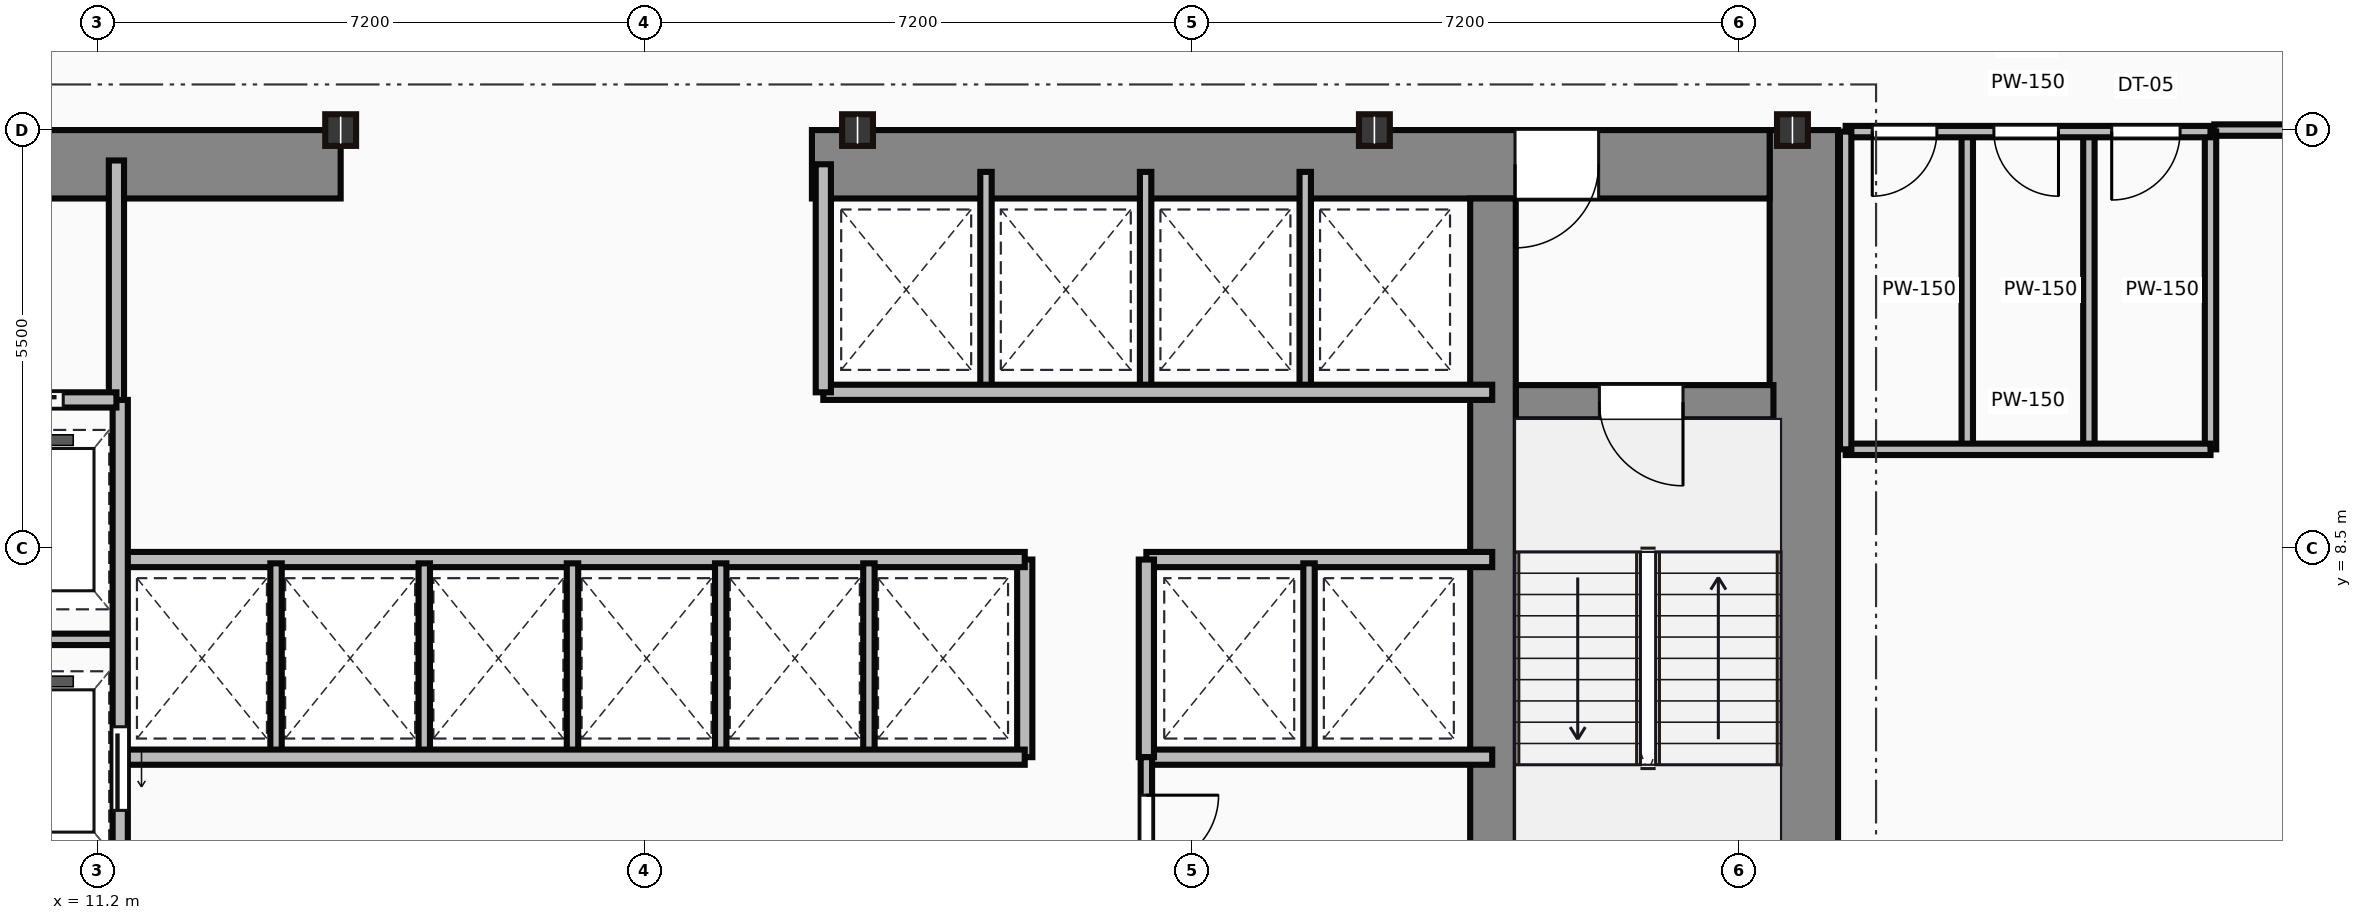
"""IFC4 building model, lengths in metres.
Left out: names, types, materials, properties, quantities, classifications, styles, units other than length and angle.
Written with IfcOpenShell. Run it as: python <this file> out.ifc"""

import sys

from ifc_helpers import new_model, si_unit, direction, frame, frame_2d, origin, origin_2d, place, context, subcontext, project, spatial, rectangle, i_section, extrude, source, transform, mapped, element, fill, save


model = new_model("IFC4")
c1 = context("Model", 3, precision=1e-05, world=origin(), true_north=direction((0.0, 1.0)))
c2 = subcontext(c1, "Body", "Model", "MODEL_VIEW")
j1 = project(units=[si_unit("LENGTHUNIT", "METRE"), si_unit("PLANEANGLEUNIT", "RADIAN")], contexts=[c1])
p1 = place(None, origin())
s1 = spatial("IfcSite", under=j1, at=p1, CompositionType="ELEMENT")
p2 = place(p1, origin())
s2 = spatial("IfcBuilding", under=s1, at=p2, CompositionType="ELEMENT")
p3 = place(p2, frame((0.0, 0.0, 61.7)))
s3 = spatial("IfcBuildingStorey", under=s2, at=p3, CompositionType="ELEMENT", Elevation=61.7)
m1 = source(origin(), c2, "Body", "SweptSolid", [
    extrude(rectangle(XDim=13.1, YDim=0.9, at=frame_2d((6.55, 0.0))), origin(), (0.0, 0.0, 1.0), 3.65),
])
p4 = place(p3, frame((33.65, 0.9, 0.0), z_axis=(0.0, 0.0, 1.0), x_axis=(0.0, 1.0, 0.0)))
e1 = element("IfcWall", 1, at=p4, inside=s3, PredefinedType="SHEAR", context=c2, shape_type="MappedRepresentation", body=[
    mapped(m1, transform((0.0, 0.0, 0.0))),
])
m2 = source(origin(), c2, "Body", "SweptSolid", [
    extrude(rectangle(XDim=9.1, YDim=0.9, at=frame_2d((4.55, 0.0))), origin(), (0.0, 0.0, 1.0), 3.65),
])
p5 = place(p3, frame((5.3, 13.55, 0.0), z_axis=(0.0, 0.0, 1.0), x_axis=(1.0, 0.0, 0.0)))
e2 = element("IfcWall", 2, at=p5, inside=s3, PredefinedType="SHEAR", context=c2, shape_type="MappedRepresentation", body=[
    mapped(m2, transform((0.0, 0.0, 0.0))),
])
p6 = place(p5, frame((4.1, 0.0, 0.0)))
e3 = element("IfcOpeningElement", 3, at=p6, cuts=e2, PredefinedType="OPENING", context=c2, shape_type="SweptSolid", body=[
    extrude(rectangle(XDim=1.1, YDim=2.15, at=frame_2d((0.55, 1.075))), frame((0.0, 0.46, 0.0), z_axis=(0.0, -1.0, 0.0), x_axis=(1.0, 0.0, 0.0)), (0.0, 0.0, 1.0), 0.92),
])
m3 = source(origin(), c2, "Body", "SweptSolid", [
    extrude(rectangle(XDim=12.6, YDim=0.9, at=frame_2d((6.3, 0.0))), origin(), (0.0, 0.0, 1.0), 3.65),
])
p7 = place(p3, frame((20.6, 13.55, 0.0), z_axis=(0.0, 0.0, 1.0), x_axis=(1.0, 0.0, 0.0)))
e4 = element("IfcWall", 4, at=p7, inside=s3, PredefinedType="SHEAR", context=c2, shape_type="MappedRepresentation", body=[
    mapped(m3, transform((0.0, 0.0, 0.0))),
])
p8 = place(p7, frame((9.25, 0.0, 0.0)))
e5 = element("IfcOpeningElement", 5, at=p8, cuts=e4, PredefinedType="OPENING", context=c2, shape_type="SweptSolid", body=[
    extrude(rectangle(XDim=1.1, YDim=2.15, at=frame_2d((0.55, 1.075))), frame((0.0, 0.46, 0.0), z_axis=(0.0, -1.0, 0.0), x_axis=(1.0, 0.0, 0.0)), (0.0, 0.0, 1.0), 0.92),
])
m4 = source(origin(), c2, "Body", "SweptSolid", [
    extrude(rectangle(XDim=12.2, YDim=0.6, at=frame_2d((6.1, 0.0))), origin(), (0.0, 0.0, 1.0), 3.65),
])
p9 = place(p3, frame((29.56, 0.9, 0.0), z_axis=(0.0, 0.0, 1.0), x_axis=(0.0, 1.0, 0.0)))
e6 = element("IfcWall", 6, at=p9, inside=s3, PredefinedType="SHEAR", context=c2, shape_type="MappedRepresentation", body=[
    mapped(m4, transform((0.0, 0.0, 0.0))),
])
m5 = source(origin(), c2, "Body", "SweptSolid", [
    extrude(rectangle(XDim=3.39, YDim=0.45, at=frame_2d((1.695, 0.0))), origin(), (0.0, 0.0, 1.0), 3.65),
])
p10 = place(p3, frame((29.86, 10.42, 0.0), z_axis=(0.0, 0.0, 1.0), x_axis=(1.0, 0.0, 0.0)))
e7 = element("IfcWall", 7, at=p10, inside=s3, PredefinedType="SHEAR", context=c2, shape_type="MappedRepresentation", body=[
    mapped(m5, transform((0.0, 0.0, 0.0))),
])
p11 = place(p10, frame((1.1, 0.0, 0.0)))
e8 = element("IfcOpeningElement", 8, at=p11, cuts=e7, PredefinedType="OPENING", context=c2, shape_type="SweptSolid", body=[
    extrude(rectangle(XDim=1.1, YDim=2.15, at=frame_2d((0.55, 1.075))), frame((0.0, 0.235, 0.0), z_axis=(0.0, -1.0, 0.0), x_axis=(1.0, 0.0, 0.0)), (0.0, 0.0, 1.0), 0.47),
])
m6 = source(origin(), c2, "Body", "SweptSolid", [
    extrude(i_section(OverallWidth=0.406, OverallDepth=0.416, WebThickness=0.03, FlangeThickness=0.048, at=origin_2d()), origin(), (0.0, 0.0, 1.0), 3.65),
])
for number, where, z_axis, x_axis in (
    (9, (14.4, 14.0, 0.0), (0.0, 0.0, 1.0), (1.0, 0.0, 0.0)),
    (10, (21.2, 14.0, 0.0), (0.0, 0.0, 1.0), (1.0, 0.0, 0.0)),
    (11, (28.0, 14.0, 0.0), (0.0, 0.0, 1.0), (1.0, 0.0, 0.0)),
    (12, (33.5, 14.0, 0.0), (0.0, 0.0, 1.0), (1.0, 0.0, 0.0)),
):
    element("IfcColumn", number, at=place(p3, frame(where, z_axis=z_axis, x_axis=x_axis)), inside=s3, PredefinedType="COLUMN", context=c2, shape_type="MappedRepresentation", body=[
        mapped(m6, transform((0.0, 0.0, 0.0))),
    ])
m7 = source(origin(), c2, "Body", "SweptSolid", [
    extrude(rectangle(XDim=3.18, YDim=0.2, at=frame_2d((1.59, 0.0))), origin(), (0.0, 0.0, 1.0), 3.4),
])
p12 = place(p3, frame((11.45, 10.42, 0.0), z_axis=(0.0, 0.0, 1.0), x_axis=(0.0, 1.0, 0.0)))
e13 = element("IfcWall", 13, at=p12, inside=s3, PredefinedType="PARTITIONING", context=c2, shape_type="MappedRepresentation", body=[
    mapped(m7, transform((0.0, 0.0, 0.0))),
])
m8 = source(origin(), c2, "Body", "SweptSolid", [
    extrude(rectangle(XDim=2.35, YDim=0.2, at=frame_2d((1.175, 0.0))), origin(), (0.0, 0.0, 1.0), 3.4),
])
p13 = place(p3, frame((9.1, 10.45, 0.0), z_axis=(0.0, 0.0, 1.0), x_axis=(1.0, 0.0, 0.0)))
e14 = element("IfcWall", 14, at=p13, inside=s3, PredefinedType="PARTITIONING", context=c2, shape_type="MappedRepresentation", body=[
    mapped(m8, transform((0.0, 0.0, 0.0))),
])
p14 = place(p13, frame((0.55, 0.0, 0.0)))
e15 = element("IfcOpeningElement", 15, at=p14, cuts=e14, PredefinedType="OPENING", context=c2, shape_type="SweptSolid", body=[
    extrude(rectangle(XDim=1.1, YDim=2.15, at=frame_2d((0.55, 1.075))), frame((0.0, 0.11, 0.0), z_axis=(0.0, -1.0, 0.0), x_axis=(1.0, 0.0, 0.0)), (0.0, 0.0, 1.0), 0.22),
])
m9 = source(origin(), c2, "Body", "SweptSolid", [
    extrude(rectangle(XDim=9.6, YDim=0.2, at=frame_2d((4.8, 0.0))), origin(), (0.0, 0.0, 1.0), 3.4),
])
p15 = place(p3, frame((11.5, 0.85, 0.0), z_axis=(0.0, 0.0, 1.0), x_axis=(0.0, 1.0, 0.0)))
e16 = element("IfcWall", 16, at=p15, inside=s3, PredefinedType="PARTITIONING", context=c2, shape_type="MappedRepresentation", body=[
    mapped(m9, transform((0.0, 0.0, 0.0))),
])
p16 = place(p15, frame((4.2, 0.0, 0.0)))
e17 = element("IfcOpeningElement", 17, at=p16, cuts=e16, PredefinedType="OPENING", context=c2, shape_type="SweptSolid", body=[
    extrude(rectangle(XDim=1.1, YDim=2.15, at=frame_2d((0.55, 1.075))), frame((0.0, 0.11, 0.0), z_axis=(0.0, -1.0, 0.0), x_axis=(1.0, 0.0, 0.0)), (0.0, 0.0, 1.0), 0.22),
])
p17 = place(p15, frame((0.9, 0.0, 0.0)))
e18 = element("IfcOpeningElement", 18, at=p17, cuts=e16, PredefinedType="OPENING", context=c2, shape_type="SweptSolid", body=[
    extrude(rectangle(XDim=1.2, YDim=2.15, at=frame_2d((0.6, 1.075))), frame((0.0, 0.11, 0.0), z_axis=(0.0, -1.0, 0.0), x_axis=(1.0, 0.0, 0.0)), (0.0, 0.0, 1.0), 0.22),
])
m10 = source(origin(), c2, "Body", "SweptSolid", [
    extrude(rectangle(XDim=2.4, YDim=0.15, at=frame_2d((1.2, 0.0))), origin(), (0.0, 0.0, 1.0), 3.4),
])
p18 = place(p3, frame((9.1, 7.3, 0.0), z_axis=(0.0, 0.0, 1.0), x_axis=(1.0, 0.0, 0.0)))
e19 = element("IfcWall", 19, at=p18, inside=s3, PredefinedType="PARTITIONING", context=c2, shape_type="MappedRepresentation", body=[
    mapped(m10, transform((0.0, 0.0, 0.0))),
])
m11 = source(origin(), c2, "Body", "SweptSolid", [
    extrude(rectangle(XDim=11.85, YDim=0.2, at=frame_2d((5.925, 0.0))), origin(), (0.0, 0.0, 1.0), 3.4),
])
for number, where, z_axis, x_axis in (
    (20, (11.55, 5.75, 0.0), (0.0, 0.0, 1.0), (1.0, 0.0, 0.0)),
    (21, (11.55, 8.35, 0.0), (0.0, 0.0, 1.0), (1.0, 0.0, 0.0)),
):
    element("IfcWall", number, at=place(p3, frame(where, z_axis=z_axis, x_axis=x_axis)), inside=s3, PredefinedType="PARTITIONING", context=c2, shape_type="MappedRepresentation", body=[
        mapped(m11, transform((0.0, 0.0, 0.0))),
    ])
m12 = source(origin(), c2, "Body", "SweptSolid", [
    extrude(rectangle(XDim=2.6, YDim=0.2, at=frame_2d((1.3, 0.0))), origin(), (0.0, 0.0, 1.0), 3.4),
])
p19 = place(p3, frame((23.4, 5.75, 0.0), z_axis=(0.0, 0.0, 1.0), x_axis=(0.0, 1.0, 0.0)))
e22 = element("IfcWall", 22, at=p19, inside=s3, PredefinedType="PARTITIONING", context=c2, shape_type="MappedRepresentation", body=[
    mapped(m12, transform((0.0, 0.0, 0.0))),
])
m13 = source(origin(), c2, "Body", "SweptSolid", [
    extrude(rectangle(XDim=2.5, YDim=0.15, at=frame_2d((1.25, 0.0))), origin(), (0.0, 0.0, 1.0), 3.4),
])
for number, where, z_axis, x_axis in (
    (23, (13.55, 5.8, 0.0), (0.0, 0.0, 1.0), (0.0, 1.0, 0.0)),
    (24, (15.5, 5.8, 0.0), (0.0, 0.0, 1.0), (0.0, 1.0, 0.0)),
    (25, (17.45, 5.8, 0.0), (0.0, 0.0, 1.0), (0.0, 1.0, 0.0)),
    (26, (19.4, 5.8, 0.0), (0.0, 0.0, 1.0), (0.0, 1.0, 0.0)),
    (27, (21.35, 5.8, 0.0), (0.0, 0.0, 1.0), (0.0, 1.0, 0.0)),
):
    element("IfcWall", number, at=place(p3, frame(where, z_axis=z_axis, x_axis=x_axis)), inside=s3, PredefinedType="PARTITIONING", context=c2, shape_type="MappedRepresentation", body=[
        mapped(m13, transform((0.0, 0.0, 0.0))),
    ])
m14 = source(origin(), c2, "Body", "SweptSolid", [
    extrude(rectangle(XDim=8.8, YDim=0.2, at=frame_2d((4.4, 0.0))), origin(), (0.0, 0.0, 1.0), 3.4),
])
p20 = place(p3, frame((20.75, 10.55, 0.0), z_axis=(0.0, 0.0, 1.0), x_axis=(1.0, 0.0, 0.0)))
e28 = element("IfcWall", 28, at=p20, inside=s3, PredefinedType="PARTITIONING", context=c2, shape_type="MappedRepresentation", body=[
    mapped(m14, transform((0.0, 0.0, 0.0))),
])
m15 = source(origin(), c2, "Body", "SweptSolid", [
    extrude(rectangle(XDim=3.0, YDim=0.2, at=frame_2d((1.5, 0.0))), origin(), (0.0, 0.0, 1.0), 3.4),
])
p21 = place(p3, frame((20.75, 10.55, 0.0), z_axis=(0.0, 0.0, 1.0), x_axis=(0.0, 1.0, 0.0)))
e29 = element("IfcWall", 29, at=p21, inside=s3, PredefinedType="PARTITIONING", context=c2, shape_type="MappedRepresentation", body=[
    mapped(m15, transform((0.0, 0.0, 0.0))),
])
m16 = source(origin(), c2, "Body", "SweptSolid", [
    extrude(rectangle(XDim=2.85, YDim=0.15, at=frame_2d((1.425, 0.0))), origin(), (0.0, 0.0, 1.0), 3.4),
])
for number, where, z_axis, x_axis in (
    (30, (22.89, 10.6, 0.0), (0.0, 0.0, 1.0), (0.0, 1.0, 0.0)),
    (31, (24.99, 10.6, 0.0), (0.0, 0.0, 1.0), (0.0, 1.0, 0.0)),
    (32, (27.09, 10.6, 0.0), (0.0, 0.0, 1.0), (0.0, 1.0, 0.0)),
):
    element("IfcWall", number, at=place(p3, frame(where, z_axis=z_axis, x_axis=x_axis)), inside=s3, PredefinedType="PARTITIONING", context=c2, shape_type="MappedRepresentation", body=[
        mapped(m16, transform((0.0, 0.0, 0.0))),
    ])
m17 = source(origin(), c2, "Body", "SweptSolid", [
    extrude(rectangle(XDim=4.55, YDim=0.2, at=frame_2d((2.275, 0.0))), origin(), (0.0, 0.0, 1.0), 3.4),
])
for number, where, z_axis, x_axis in (
    (33, (25.0, 8.35, 0.0), (0.0, 0.0, 1.0), (1.0, 0.0, 0.0)),
    (34, (25.0, 5.75, 0.0), (0.0, 0.0, 1.0), (1.0, 0.0, 0.0)),
):
    element("IfcWall", number, at=place(p3, frame(where, z_axis=z_axis, x_axis=x_axis)), inside=s3, PredefinedType="PARTITIONING", context=c2, shape_type="MappedRepresentation", body=[
        mapped(m17, transform((0.0, 0.0, 0.0))),
    ])
p22 = place(p3, frame((25.0, 5.75, 0.0), z_axis=(0.0, 0.0, 1.0), x_axis=(0.0, 1.0, 0.0)))
e35 = element("IfcWall", 35, at=p22, inside=s3, PredefinedType="PARTITIONING", context=c2, shape_type="MappedRepresentation", body=[
    mapped(m12, transform((0.0, 0.0, 0.0))),
])
p23 = place(p3, frame((27.14, 5.8, 0.0), z_axis=(0.0, 0.0, 1.0), x_axis=(0.0, 1.0, 0.0)))
e36 = element("IfcWall", 36, at=p23, inside=s3, PredefinedType="PARTITIONING", context=c2, shape_type="MappedRepresentation", body=[
    mapped(m13, transform((0.0, 0.0, 0.0))),
])
m18 = source(origin(), c2, "Body", "SweptSolid", [
    extrude(rectangle(XDim=4.9, YDim=0.15, at=frame_2d((2.45, 0.0))), origin(), (0.0, 0.0, 1.0), 3.4),
])
p24 = place(p3, frame((25.0, 0.85, 0.0), z_axis=(0.0, 0.0, 1.0), x_axis=(0.0, 1.0, 0.0)))
e37 = element("IfcWall", 37, at=p24, inside=s3, PredefinedType="PARTITIONING", context=c2, shape_type="MappedRepresentation", body=[
    mapped(m18, transform((0.0, 0.0, 0.0))),
])
p25 = place(p24, frame((1.8, 0.0, 0.0)))
e38 = element("IfcOpeningElement", 38, at=p25, cuts=e37, PredefinedType="OPENING", context=c2, shape_type="SweptSolid", body=[
    extrude(rectangle(XDim=0.95, YDim=2.15, at=frame_2d((0.475, 1.075))), frame((0.0, 0.085, 0.0), z_axis=(0.0, -1.0, 0.0), x_axis=(1.0, 0.0, 0.0)), (0.0, 0.0, 1.0), 0.17),
])
p26 = place(p24, frame((3.45, 0.0, 0.0)))
e39 = element("IfcOpeningElement", 39, at=p26, cuts=e37, PredefinedType="OPENING", context=c2, shape_type="SweptSolid", body=[
    extrude(rectangle(XDim=0.95, YDim=2.15, at=frame_2d((0.475, 1.075))), frame((0.0, 0.085, 0.0), z_axis=(0.0, -1.0, 0.0), x_axis=(1.0, 0.0, 0.0)), (0.0, 0.0, 1.0), 0.17),
])
m19 = source(origin(), c2, "Body", "SweptSolid", [
    extrude(rectangle(XDim=4.8, YDim=0.15, at=frame_2d((2.4, 0.0))), origin(), (0.0, 0.0, 1.0), 2.625),
])
p27 = place(p3, frame((34.2, 13.98, 0.0), z_axis=(0.0, 0.0, 1.0), x_axis=(1.0, 0.0, 0.0)))
e40 = element("IfcWall", 40, at=p27, inside=s3, PredefinedType="PARTITIONING", context=c2, shape_type="MappedRepresentation", body=[
    mapped(m19, transform((0.0, 0.0, 0.0))),
])
p28 = place(p27, frame((0.35, 0.0, 0.0)))
e41 = element("IfcOpeningElement", 41, at=p28, cuts=e40, PredefinedType="OPENING", context=c2, shape_type="SweptSolid", body=[
    extrude(rectangle(XDim=0.85, YDim=2.1, at=frame_2d((0.425, 1.05))), frame((0.0, 0.085, 0.0), z_axis=(0.0, -1.0, 0.0), x_axis=(1.0, 0.0, 0.0)), (0.0, 0.0, 1.0), 0.17),
])
p29 = place(p27, frame((1.95, 0.0, 0.0)))
e42 = element("IfcOpeningElement", 42, at=p29, cuts=e40, PredefinedType="OPENING", context=c2, shape_type="SweptSolid", body=[
    extrude(rectangle(XDim=0.85, YDim=2.1, at=frame_2d((0.425, 1.05))), frame((0.0, 0.085, 0.0), z_axis=(0.0, -1.0, 0.0), x_axis=(1.0, 0.0, 0.0)), (0.0, 0.0, 1.0), 0.17),
])
p30 = place(p27, frame((3.5, 0.0, 0.0)))
e43 = element("IfcOpeningElement", 43, at=p30, cuts=e40, PredefinedType="OPENING", context=c2, shape_type="SweptSolid", body=[
    extrude(rectangle(XDim=0.9, YDim=2.1, at=frame_2d((0.45, 1.05))), frame((0.0, 0.085, 0.0), z_axis=(0.0, -1.0, 0.0), x_axis=(1.0, 0.0, 0.0)), (0.0, 0.0, 1.0), 0.17),
])
m20 = source(origin(), c2, "Body", "SweptSolid", [
    extrude(rectangle(XDim=4.8, YDim=0.15, at=frame_2d((2.4, 0.0))), origin(), (0.0, 0.0, 1.0), 3.4),
])
p31 = place(p3, frame((34.2, 9.8, 0.0), z_axis=(0.0, 0.0, 1.0), x_axis=(1.0, 0.0, 0.0)))
e44 = element("IfcWall", 44, at=p31, inside=s3, PredefinedType="PARTITIONING", context=c2, shape_type="MappedRepresentation", body=[
    mapped(m20, transform((0.0, 0.0, 0.0))),
])
m21 = source(origin(), c2, "Body", "SweptSolid", [
    extrude(rectangle(XDim=4.18, YDim=0.15, at=frame_2d((2.09, 0.0))), origin(), (0.0, 0.0, 1.0), 3.4),
])
for number, where, z_axis, x_axis in (
    (45, (39.0, 9.8, 0.0), (0.0, 0.0, 1.0), (0.0, 1.0, 0.0)),
    (46, (34.2, 9.8, 0.0), (0.0, 0.0, 1.0), (0.0, 1.0, 0.0)),
    (47, (35.8, 9.8, 0.0), (0.0, 0.0, 1.0), (0.0, 1.0, 0.0)),
    (48, (37.4, 9.8, 0.0), (0.0, 0.0, 1.0), (0.0, 1.0, 0.0)),
):
    element("IfcWall", number, at=place(p3, frame(where, z_axis=z_axis, x_axis=x_axis)), inside=s3, PredefinedType="PARTITIONING", context=c2, shape_type="MappedRepresentation", body=[
        mapped(m21, transform((0.0, 0.0, 0.0))),
    ])
m22 = source(origin(), c2, "Body", "SweptSolid", [
    extrude(rectangle(XDim=7.75, YDim=0.15, at=frame_2d((3.875, 0.0))), origin(), (0.0, 0.0, 1.0), 2.625),
])
p32 = place(p3, frame((46.8, 14.0, 0.0), z_axis=(0.0, 0.0, 1.0), x_axis=(-1.0, 0.0, 0.0)))
e49 = element("IfcWall", 49, at=p32, inside=s3, PredefinedType="PARTITIONING", context=c2, shape_type="MappedRepresentation", body=[
    mapped(m22, transform((0.0, 0.0, 0.0))),
])
m23 = source(origin(), c2, "Body", "SweptSolid", [
    extrude(rectangle(XDim=1.1, YDim=2.15, at=frame_2d((0.55, 1.075))), frame((0.0, 0.025, 0.0), z_axis=(0.0, -1.0, 0.0), x_axis=(1.0, 0.0, 0.0)), (0.0, 0.0, 1.0), 0.05),
])
p33 = place(p11, frame((1.1, 0.0, 0.0), z_axis=(0.0, 0.0, 1.0), x_axis=(-1.0, 0.0, 0.0)))
e50 = element("IfcDoor", 50, at=p33, inside=s3, OperationType="SINGLE_SWING_RIGHT", PredefinedType="DOOR", context=c2, shape_type="MappedRepresentation", body=[
    mapped(m23, transform((0.0, 0.0, 0.0))),
])
fill(e8, e50)
p34 = place(p8, origin())
e51 = element("IfcDoor", 51, at=p34, inside=s3, OperationType="SINGLE_SWING_LEFT", PredefinedType="DOOR", context=c2, shape_type="MappedRepresentation", body=[
    mapped(m23, transform((0.0, 0.0, 0.0))),
])
fill(e5, e51)
p35 = place(p14, origin())
e52 = element("IfcDoor", 52, at=p35, inside=s3, OperationType="SLIDING_TO_LEFT", PredefinedType="DOOR", context=c2, shape_type="MappedRepresentation", body=[
    mapped(m23, transform((0.0, 0.0, 0.0))),
])
fill(e15, e52)
p36 = place(p16, frame((1.1, 0.0, 0.0), z_axis=(0.0, 0.0, 1.0), x_axis=(-1.0, 0.0, 0.0)))
e53 = element("IfcDoor", 53, at=p36, inside=s3, OperationType="SLIDING_TO_LEFT", PredefinedType="DOOR", context=c2, shape_type="MappedRepresentation", body=[
    mapped(m23, transform((0.0, 0.0, 0.0))),
])
fill(e17, e53)
m24 = source(origin(), c2, "Body", "SweptSolid", [
    extrude(rectangle(XDim=0.95, YDim=2.15, at=frame_2d((0.475, 1.075))), frame((0.0, 0.025, 0.0), z_axis=(0.0, -1.0, 0.0), x_axis=(1.0, 0.0, 0.0)), (0.0, 0.0, 1.0), 0.05),
])
p37 = place(p26, origin())
e54 = element("IfcDoor", 54, at=p37, inside=s3, OperationType="SINGLE_SWING_RIGHT", PredefinedType="DOOR", context=c2, shape_type="MappedRepresentation", body=[
    mapped(m24, transform((0.0, 0.0, 0.0))),
])
fill(e39, e54)
m25 = source(origin(), c2, "Body", "SweptSolid", [
    extrude(rectangle(XDim=0.85, YDim=2.1, at=frame_2d((0.425, 1.05))), frame((0.0, 0.025, 0.0), z_axis=(0.0, -1.0, 0.0), x_axis=(1.0, 0.0, 0.0)), (0.0, 0.0, 1.0), 0.05),
])
p38 = place(p28, frame((0.85, 0.0, 0.0), z_axis=(0.0, 0.0, 1.0), x_axis=(-1.0, 0.0, 0.0)))
e55 = element("IfcDoor", 55, at=p38, inside=s3, OperationType="SINGLE_SWING_LEFT", PredefinedType="DOOR", context=c2, shape_type="MappedRepresentation", body=[
    mapped(m25, transform((0.0, 0.0, 0.0))),
])
fill(e41, e55)
p39 = place(p29, frame((0.85, 0.0, 0.0), z_axis=(0.0, 0.0, 1.0), x_axis=(-1.0, 0.0, 0.0)))
e56 = element("IfcDoor", 56, at=p39, inside=s3, OperationType="SINGLE_SWING_RIGHT", PredefinedType="DOOR", context=c2, shape_type="MappedRepresentation", body=[
    mapped(m25, transform((0.0, 0.0, 0.0))),
])
fill(e42, e56)
m26 = source(origin(), c2, "Body", "SweptSolid", [
    extrude(rectangle(XDim=0.9, YDim=2.1, at=frame_2d((0.45, 1.05))), frame((0.0, 0.025, 0.0), z_axis=(0.0, -1.0, 0.0), x_axis=(1.0, 0.0, 0.0)), (0.0, 0.0, 1.0), 0.05),
])
p40 = place(p30, frame((0.9, 0.0, 0.0), z_axis=(0.0, 0.0, 1.0), x_axis=(-1.0, 0.0, 0.0)))
e57 = element("IfcDoor", 57, at=p40, inside=s3, OperationType="SINGLE_SWING_LEFT", PredefinedType="DOOR", context=c2, shape_type="MappedRepresentation", body=[
    mapped(m26, transform((0.0, 0.0, 0.0))),
])
fill(e43, e57)
save(model, sys.argv[1])
